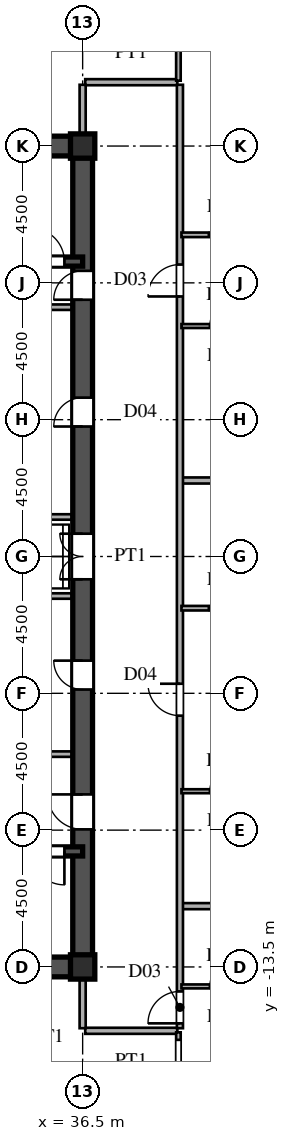
"""IFC4 building model, lengths in metres.
Left out: names, types, materials, properties, quantities, classifications, styles, units other than length and angle.
Written with IfcOpenShell. Run it as: python <this file> out.ifc"""

import sys

from ifc_helpers import new_model, si_unit, direction, frame, frame_2d, origin, origin_2d, place, context, subcontext, project, spatial, rectangle, i_section, extrude, source, transform, mapped, element, fill, save


model = new_model("IFC4")
c1 = context("Model", 3, precision=1e-05, world=origin(), true_north=direction((0.0, 1.0)))
c2 = subcontext(c1, "Body", "Model", "MODEL_VIEW")
j1 = project(units=[si_unit("LENGTHUNIT", "METRE"), si_unit("PLANEANGLEUNIT", "RADIAN")], contexts=[c1])
p1 = place(None, origin())
s1 = spatial("IfcSite", under=j1, at=p1, CompositionType="ELEMENT")
p2 = place(p1, origin())
s2 = spatial("IfcBuilding", under=s1, at=p2, CompositionType="ELEMENT")
p3 = place(p2, frame((0.0, 0.0, 65.7)))
s3 = spatial("IfcBuildingStorey", under=s2, at=p3, CompositionType="ELEMENT", Elevation=65.7)
m1 = source(origin(), c2, "Body", "SweptSolid", [
    extrude(i_section(OverallWidth=0.8, OverallDepth=0.8, WebThickness=0.032, FlangeThickness=0.05, at=origin_2d()), origin(), (0.0, 0.0, 1.0), 3.6),
])
for number, where, z_axis, x_axis in (
    (1, (36.5, -13.5, 0.0), (0.0, 0.0, 1.0), (1.0, 0.0, 0.0)),
    (2, (36.5, 13.5, 0.0), (0.0, 0.0, 1.0), (1.0, 0.0, 0.0)),
):
    element("IfcColumn", number, at=place(p3, frame(where, z_axis=z_axis, x_axis=x_axis)), inside=s3, PredefinedType="COLUMN", context=c2, shape_type="MappedRepresentation", body=[
        mapped(m1, transform((0.0, 0.0, 0.0), scale=1.0)),
    ])
for number, where, z_axis, x_axis in (
    (3, (27.5, -13.5, 0.0), (0.0, 0.0, 1.0), (1.0, 0.0, 0.0)),
    (4, (27.5, 13.5, 0.0), (0.0, 0.0, 1.0), (1.0, 0.0, 0.0)),
):
    element("IfcWall", number, at=place(p3, frame(where, z_axis=z_axis, x_axis=x_axis)), inside=s3, PredefinedType="SHEAR", context=c2, shape_type="SweptSolid", body=[
        extrude(rectangle(XDim=9.0, YDim=0.65, at=frame_2d((4.5, 0.0))), origin(), (0.0, 0.0, 1.0), 3.38),
    ])
p4 = place(p3, frame((36.5, -13.65, 0.0), z_axis=(0.0, 0.0, 1.0), x_axis=(0.0, 1.0, 0.0)))
e5 = element("IfcWall", 5, at=p4, inside=s3, PredefinedType="SHEAR", context=c2, shape_type="SweptSolid", body=[
    extrude(rectangle(XDim=7.15, YDim=0.65, at=frame_2d((3.575, 0.0))), origin(), (0.0, 0.0, 1.0), 3.38),
])
p5 = place(p4, frame((4.675, 0.0, 0.0)))
e6 = element("IfcOpeningElement", 6, at=p5, cuts=e5, PredefinedType="OPENING", context=c2, shape_type="SweptSolid", body=[
    extrude(rectangle(XDim=1.15, YDim=2.2, at=frame_2d((0.575, 1.1))), frame((0.0, 0.335, 0.0), z_axis=(0.0, -1.0, 0.0), x_axis=(1.0, 0.0, 0.0)), (0.0, 0.0, 1.0), 0.67),
])
p6 = place(p3, frame((36.5, -1.3, 0.0), z_axis=(0.0, 0.0, 1.0), x_axis=(0.0, 1.0, 0.0)))
e7 = element("IfcWall", 7, at=p6, inside=s3, PredefinedType="SHEAR", context=c2, shape_type="SweptSolid", body=[
    extrude(rectangle(XDim=2.6, YDim=0.65, at=frame_2d((1.3, 0.0))), origin(), (0.0, 0.0, 1.0), 3.38),
])
p7 = place(p6, frame((0.55, 0.0, 0.0)))
e8 = element("IfcOpeningElement", 8, at=p7, cuts=e7, PredefinedType="OPENING", context=c2, shape_type="SweptSolid", body=[
    extrude(rectangle(XDim=1.5, YDim=2.3, at=frame_2d((0.75, 1.15))), frame((0.0, 0.335, 0.0), z_axis=(0.0, -1.0, 0.0), x_axis=(1.0, 0.0, 0.0)), (0.0, 0.0, 1.0), 0.67),
])
p8 = place(p3, frame((36.5, 8.2, 0.0), z_axis=(0.0, 0.0, 1.0), x_axis=(0.0, 1.0, 0.0)))
e9 = element("IfcWall", 9, at=p8, inside=s3, PredefinedType="SHEAR", context=c2, shape_type="SweptSolid", body=[
    extrude(rectangle(XDim=5.45, YDim=0.65, at=frame_2d((2.725, 0.0))), origin(), (0.0, 0.0, 1.0), 3.38),
])
p9 = place(p8, frame((0.245, 0.0, 0.0)))
e10 = element("IfcOpeningElement", 10, at=p9, cuts=e9, PredefinedType="OPENING", context=c2, shape_type="SweptSolid", body=[
    extrude(rectangle(XDim=0.95, YDim=2.15, at=frame_2d((0.475, 1.075))), frame((0.0, 0.335, 0.0), z_axis=(0.0, -1.0, 0.0), x_axis=(1.0, 0.0, 0.0)), (0.0, 0.0, 1.0), 0.67),
])
p10 = place(p3, frame((36.5, -6.5, 0.0), z_axis=(0.0, 0.0, 1.0), x_axis=(0.0, 1.0, 0.0)))
e11 = element("IfcWall", 11, at=p10, inside=s3, PredefinedType="SHEAR", context=c2, shape_type="SweptSolid", body=[
    extrude(rectangle(XDim=5.2, YDim=0.65, at=frame_2d((2.6, 0.0))), origin(), (0.0, 0.0, 1.0), 3.38),
])
p11 = place(p10, frame((2.125, 0.0, 0.0)))
e12 = element("IfcOpeningElement", 12, at=p11, cuts=e11, PredefinedType="OPENING", context=c2, shape_type="SweptSolid", body=[
    extrude(rectangle(XDim=0.95, YDim=2.15, at=frame_2d((0.475, 1.075))), frame((0.0, 0.335, 0.0), z_axis=(0.0, -1.0, 0.0), x_axis=(1.0, 0.0, 0.0)), (0.0, 0.0, 1.0), 0.67),
])
p12 = place(p3, frame((36.5, 1.3, 0.0), z_axis=(0.0, 0.0, 1.0), x_axis=(0.0, 1.0, 0.0)))
e13 = element("IfcWall", 13, at=p12, inside=s3, PredefinedType="SHEAR", context=c2, shape_type="SweptSolid", body=[
    extrude(rectangle(XDim=6.9, YDim=0.65, at=frame_2d((3.45, 0.0))), origin(), (0.0, 0.0, 1.0), 3.38),
])
p13 = place(p12, frame((2.975, 0.0, 0.0)))
e14 = element("IfcOpeningElement", 14, at=p13, cuts=e13, PredefinedType="OPENING", context=c2, shape_type="SweptSolid", body=[
    extrude(rectangle(XDim=0.95, YDim=2.15, at=frame_2d((0.475, 1.075))), frame((0.0, 0.335, 0.0), z_axis=(0.0, -1.0, 0.0), x_axis=(1.0, 0.0, 0.0)), (0.0, 0.0, 1.0), 0.67),
])
p14 = place(p3, frame((27.5, -9.7, 0.0), z_axis=(0.0, 0.0, 1.0), x_axis=(1.0, 0.0, 0.0)))
e15 = element("IfcWall", 15, at=p14, inside=s3, PredefinedType="SHEAR", context=c2, shape_type="SweptSolid", body=[
    extrude(rectangle(XDim=9.0, YDim=0.3, at=frame_2d((4.5, 0.0))), origin(), (0.0, 0.0, 1.0), 3.38),
])
p15 = place(p14, frame((7.3, 0.0, 0.0)))
e16 = element("IfcOpeningElement", 16, at=p15, cuts=e15, PredefinedType="OPENING", context=c2, shape_type="SweptSolid", body=[
    extrude(rectangle(XDim=1.1, YDim=2.2, at=frame_2d((0.55, 1.1))), frame((0.0, 0.16, 0.0), z_axis=(0.0, -1.0, 0.0), x_axis=(1.0, 0.0, 0.0)), (0.0, 0.0, 1.0), 0.32),
])
p16 = place(p3, frame((27.5, 9.7, 0.0), z_axis=(0.0, 0.0, 1.0), x_axis=(1.0, 0.0, 0.0)))
e17 = element("IfcWall", 17, at=p16, inside=s3, PredefinedType="SHEAR", context=c2, shape_type="SweptSolid", body=[
    extrude(rectangle(XDim=9.0, YDim=0.3, at=frame_2d((4.5, 0.0))), origin(), (0.0, 0.0, 1.0), 3.38),
])
p17 = place(p16, frame((7.3, 0.0, 0.0)))
e18 = element("IfcOpeningElement", 18, at=p17, cuts=e17, PredefinedType="OPENING", context=c2, shape_type="SweptSolid", body=[
    extrude(rectangle(XDim=1.1, YDim=2.2, at=frame_2d((0.55, 1.1))), frame((0.0, 0.16, 0.0), z_axis=(0.0, -1.0, 0.0), x_axis=(1.0, 0.0, 0.0)), (0.0, 0.0, 1.0), 0.32),
])
for number, where, z_axis, x_axis in (
    (19, (30.45, -6.5, 0.0), (0.0, 0.0, 1.0), (1.0, 0.0, 0.0)),
    (20, (30.45, 8.2, 0.0), (0.0, 0.0, 1.0), (1.0, 0.0, 0.0)),
):
    element("IfcWall", number, at=place(p3, frame(where, z_axis=z_axis, x_axis=x_axis)), inside=s3, PredefinedType="PARTITIONING", context=c2, shape_type="SweptSolid", body=[
        extrude(rectangle(XDim=5.7, YDim=0.18, at=frame_2d((2.85, 0.0))), origin(), (0.0, 0.0, 1.0), 3.38),
    ])
for number, where, z_axis, x_axis in (
    (21, (33.2, -1.3, 0.0), (0.0, 0.0, 1.0), (1.0, 0.0, 0.0)),
    (22, (33.2, 1.3, 0.0), (0.0, 0.0, 1.0), (1.0, 0.0, 0.0)),
):
    element("IfcWall", number, at=place(p3, frame(where, z_axis=z_axis, x_axis=x_axis)), inside=s3, PredefinedType="PARTITIONING", context=c2, shape_type="SweptSolid", body=[
        extrude(rectangle(XDim=2.95, YDim=0.18, at=frame_2d((1.475, 0.0))), origin(), (0.0, 0.0, 1.0), 3.38),
    ])
p18 = place(p3, frame((36.585, -15.6, 0.0), z_axis=(0.0, 0.0, 1.0), x_axis=(1.0, 0.0, 0.0)))
e23 = element("IfcWall", 23, at=p18, inside=s3, PredefinedType="PARTITIONING", context=c2, shape_type="SweptSolid", body=[
    extrude(rectangle(XDim=3.03, YDim=0.2, at=frame_2d((1.515, 0.0))), origin(), (0.0, 0.0, 1.0), 3.38),
])
p19 = place(p3, frame((39.75, -14.14, 0.0), z_axis=(0.0, 0.0, 1.0), x_axis=(1.0, 0.0, 0.0)))
e24 = element("IfcWall", 24, at=p19, inside=s3, PredefinedType="PARTITIONING", context=c2, shape_type="SweptSolid", body=[
    extrude(rectangle(XDim=2.75, YDim=0.13, at=frame_2d((1.375, 0.0))), origin(), (0.0, 0.0, 1.0), 3.38),
])
p20 = place(p19, frame((0.935, 0.0, 0.0)))
e25 = element("IfcOpeningElement", 25, at=p20, cuts=e24, PredefinedType="OPENING", context=c2, shape_type="SweptSolid", body=[
    extrude(rectangle(XDim=0.88, YDim=2.1, at=frame_2d((0.44, 1.05))), frame((0.0, 0.075, 0.0), z_axis=(0.0, -1.0, 0.0), x_axis=(1.0, 0.0, 0.0)), (0.0, 0.0, 1.0), 0.15),
])
p21 = place(p3, frame((39.78, -11.5, 0.0), z_axis=(0.0, 0.0, 1.0), x_axis=(1.0, 0.0, 0.0)))
e26 = element("IfcWall", 26, at=p21, inside=s3, PredefinedType="PARTITIONING", context=c2, shape_type="SweptSolid", body=[
    extrude(rectangle(XDim=22.343, YDim=0.2, at=frame_2d((11.171, 0.0))), origin(), (0.0, 0.0, 1.0), 3.38),
])
p22 = place(p3, frame((39.75, -7.72, 0.0), z_axis=(0.0, 0.0, 1.0), x_axis=(1.0, 0.0, 0.0)))
e27 = element("IfcWall", 27, at=p22, inside=s3, PredefinedType="PARTITIONING", context=c2, shape_type="SweptSolid", body=[
    extrude(rectangle(XDim=2.75, YDim=0.13, at=frame_2d((1.375, 0.0))), origin(), (0.0, 0.0, 1.0), 3.38),
])
p23 = place(p22, frame((0.935, 0.0, 0.0)))
e28 = element("IfcOpeningElement", 28, at=p23, cuts=e27, PredefinedType="OPENING", context=c2, shape_type="SweptSolid", body=[
    extrude(rectangle(XDim=0.88, YDim=2.1, at=frame_2d((0.44, 1.05))), frame((0.0, 0.075, 0.0), z_axis=(0.0, -1.0, 0.0), x_axis=(1.0, 0.0, 0.0)), (0.0, 0.0, 1.0), 0.15),
])
p24 = place(p3, frame((39.75, -1.7, 0.0), z_axis=(0.0, 0.0, 1.0), x_axis=(1.0, 0.0, 0.0)))
e29 = element("IfcWall", 29, at=p24, inside=s3, PredefinedType="PARTITIONING", context=c2, shape_type="SweptSolid", body=[
    extrude(rectangle(XDim=2.75, YDim=0.15, at=frame_2d((1.375, 0.0))), origin(), (0.0, 0.0, 1.0), 3.38),
])
p25 = place(p24, frame((0.9, 0.0, 0.0)))
e30 = element("IfcOpeningElement", 30, at=p25, cuts=e29, PredefinedType="OPENING", context=c2, shape_type="SweptSolid", body=[
    extrude(rectangle(XDim=0.95, YDim=2.15, at=frame_2d((0.475, 1.075))), frame((0.0, 0.085, 0.0), z_axis=(0.0, -1.0, 0.0), x_axis=(1.0, 0.0, 0.0)), (0.0, 0.0, 1.0), 0.17),
])
p26 = place(p3, frame((39.78, 2.5, 0.0), z_axis=(0.0, 0.0, 1.0), x_axis=(1.0, 0.0, 0.0)))
e31 = element("IfcWall", 31, at=p26, inside=s3, PredefinedType="PARTITIONING", context=c2, shape_type="SweptSolid", body=[
    extrude(rectangle(XDim=31.225, YDim=0.2, at=frame_2d((15.612, 0.0))), origin(), (0.0, 0.0, 1.0), 3.38),
])
p27 = place(p3, frame((39.75, 7.58, 0.0), z_axis=(0.0, 0.0, 1.0), x_axis=(1.0, 0.0, 0.0)))
e32 = element("IfcWall", 32, at=p27, inside=s3, PredefinedType="PARTITIONING", context=c2, shape_type="SweptSolid", body=[
    extrude(rectangle(XDim=2.75, YDim=0.13, at=frame_2d((1.375, 0.0))), origin(), (0.0, 0.0, 1.0), 3.38),
])
p28 = place(p27, frame((0.935, 0.0, 0.0)))
e33 = element("IfcOpeningElement", 33, at=p28, cuts=e32, PredefinedType="OPENING", context=c2, shape_type="SweptSolid", body=[
    extrude(rectangle(XDim=0.88, YDim=2.1, at=frame_2d((0.44, 1.05))), frame((0.0, 0.075, 0.0), z_axis=(0.0, -1.0, 0.0), x_axis=(1.0, 0.0, 0.0)), (0.0, 0.0, 1.0), 0.15),
])
p29 = place(p3, frame((39.75, 10.58, 0.0), z_axis=(0.0, 0.0, 1.0), x_axis=(1.0, 0.0, 0.0)))
e34 = element("IfcWall", 34, at=p29, inside=s3, PredefinedType="PARTITIONING", context=c2, shape_type="SweptSolid", body=[
    extrude(rectangle(XDim=2.75, YDim=0.15, at=frame_2d((1.375, 0.0))), origin(), (0.0, 0.0, 1.0), 3.38),
])
p30 = place(p29, frame((0.9, 0.0, 0.0)))
e35 = element("IfcOpeningElement", 35, at=p30, cuts=e34, PredefinedType="OPENING", context=c2, shape_type="SweptSolid", body=[
    extrude(rectangle(XDim=0.95, YDim=2.15, at=frame_2d((0.475, 1.075))), frame((0.0, 0.085, 0.0), z_axis=(0.0, -1.0, 0.0), x_axis=(1.0, 0.0, 0.0)), (0.0, 0.0, 1.0), 0.17),
])
p31 = place(p3, frame((36.585, 15.6, 0.0), z_axis=(0.0, 0.0, 1.0), x_axis=(1.0, 0.0, 0.0)))
e36 = element("IfcWall", 36, at=p31, inside=s3, PredefinedType="PARTITIONING", context=c2, shape_type="SweptSolid", body=[
    extrude(rectangle(XDim=3.03, YDim=0.2, at=frame_2d((1.515, 0.0))), origin(), (0.0, 0.0, 1.0), 3.38),
])
for number, where, z_axis, x_axis in (
    (37, (36.5, -15.515, 0.0), (0.0, 0.0, 1.0), (0.0, 1.0, 0.0)),
    (38, (36.5, 13.83, 0.0), (0.0, 0.0, 1.0), (0.0, 1.0, 0.0)),
):
    element("IfcWall", number, at=place(p3, frame(where, z_axis=z_axis, x_axis=x_axis)), inside=s3, PredefinedType="PARTITIONING", context=c2, shape_type="SweptSolid", body=[
        extrude(rectangle(XDim=1.685, YDim=0.2, at=frame_2d((0.842, 0.0))), origin(), (0.0, 0.0, 1.0), 2.68),
    ])
p32 = place(p3, frame((39.65, -21.642, 0.0), z_axis=(0.0, 0.0, 1.0), x_axis=(0.0, 1.0, 0.0)))
e39 = element("IfcWall", 39, at=p32, inside=s3, PredefinedType="PARTITIONING", context=c2, shape_type="SweptSolid", body=[
    extrude(rectangle(XDim=5.992, YDim=0.15, at=frame_2d((2.996, 0.0))), origin(), (0.0, 0.0, 1.0), 3.38),
])
p33 = place(p32, frame((4.794, 0.0, 0.0)))
e40 = element("IfcOpeningElement", 40, at=p33, cuts=e39, PredefinedType="OPENING", context=c2, shape_type="SweptSolid", body=[
    extrude(rectangle(XDim=0.95, YDim=2.15, at=frame_2d((0.475, 1.075))), frame((0.0, 0.085, 0.0), z_axis=(0.0, -1.0, 0.0), x_axis=(1.0, 0.0, 0.0)), (0.0, 0.0, 1.0), 0.17),
])
p34 = place(p3, frame((39.65, 15.65, 0.0), z_axis=(0.0, 0.0, 1.0), x_axis=(0.0, 1.0, 0.0)))
e41 = element("IfcWall", 41, at=p34, inside=s3, PredefinedType="PARTITIONING", context=c2, shape_type="SweptSolid", body=[
    extrude(rectangle(XDim=5.992, YDim=0.15, at=frame_2d((2.996, 0.0))), origin(), (0.0, 0.0, 1.0), 3.38),
])
p35 = place(p34, frame((1.425, 0.0, 0.0)))
e42 = element("IfcOpeningElement", 42, at=p35, cuts=e41, PredefinedType="OPENING", context=c2, shape_type="SweptSolid", body=[
    extrude(rectangle(XDim=0.95, YDim=2.15, at=frame_2d((0.475, 1.075))), frame((0.0, 0.085, 0.0), z_axis=(0.0, -1.0, 0.0), x_axis=(1.0, 0.0, 0.0)), (0.0, 0.0, 1.0), 0.17),
])
p36 = place(p3, frame((39.7, -15.515, 0.0), z_axis=(0.0, 0.0, 1.0), x_axis=(0.0, 1.0, 0.0)))
e43 = element("IfcWall", 43, at=p36, inside=s3, PredefinedType="PARTITIONING", context=c2, shape_type="SweptSolid", body=[
    extrude(rectangle(XDim=31.03, YDim=0.2, at=frame_2d((15.515, 0.0))), origin(), (0.0, 0.0, 1.0), 3.38),
])
p37 = place(p36, frame((0.16, 0.0, 0.0)))
e44 = element("IfcOpeningElement", 44, at=p37, cuts=e43, PredefinedType="OPENING", context=c2, shape_type="SweptSolid", body=[
    extrude(rectangle(XDim=1.05, YDim=2.25, at=frame_2d((0.525, 1.125))), frame((0.0, 0.11, 0.0), z_axis=(0.0, -1.0, 0.0), x_axis=(1.0, 0.0, 0.0)), (0.0, 0.0, 1.0), 0.22),
])
p38 = place(p36, frame((10.28, 0.0, 0.0)))
e45 = element("IfcOpeningElement", 45, at=p38, cuts=e43, PredefinedType="OPENING", context=c2, shape_type="SweptSolid", body=[
    extrude(rectangle(XDim=1.05, YDim=2.25, at=frame_2d((0.525, 1.125))), frame((0.0, 0.11, 0.0), z_axis=(0.0, -1.0, 0.0), x_axis=(1.0, 0.0, 0.0)), (0.0, 0.0, 1.0), 0.22),
])
p39 = place(p36, frame((24.067, 0.0, 0.0)))
e46 = element("IfcOpeningElement", 46, at=p39, cuts=e43, PredefinedType="OPENING", context=c2, shape_type="SweptSolid", body=[
    extrude(rectangle(XDim=1.05, YDim=2.25, at=frame_2d((0.525, 1.125))), frame((0.0, 0.11, 0.0), z_axis=(0.0, -1.0, 0.0), x_axis=(1.0, 0.0, 0.0)), (0.0, 0.0, 1.0), 0.22),
])
m2 = source(origin(), c2, "Body", "SweptSolid", [
    extrude(rectangle(XDim=1.15, YDim=2.2, at=frame_2d((0.575, 1.1))), frame((0.0, 0.025, 0.0), z_axis=(0.0, -1.0, 0.0), x_axis=(1.0, 0.0, 0.0)), (0.0, 0.0, 1.0), 0.05),
])
p40 = place(p5, origin())
e47 = element("IfcDoor", 47, at=p40, inside=s3, OperationType="SINGLE_SWING_RIGHT", PredefinedType="DOOR", context=c2, shape_type="MappedRepresentation", body=[
    mapped(m2, transform((0.0, 0.0, 0.0), scale=1.0)),
])
fill(e6, e47)
m3 = source(origin(), c2, "Body", "SweptSolid", [
    extrude(rectangle(XDim=1.5, YDim=2.3, at=frame_2d((0.75, 1.15))), frame((0.0, 0.025, 0.0), z_axis=(0.0, -1.0, 0.0), x_axis=(1.0, 0.0, 0.0)), (0.0, 0.0, 1.0), 0.05),
])
p41 = place(p7, origin())
e48 = element("IfcDoor", 48, at=p41, inside=s3, OperationType="DOUBLE_SWING_LEFT", PredefinedType="DOOR", context=c2, shape_type="MappedRepresentation", body=[
    mapped(m3, transform((0.0, 0.0, 0.0), scale=1.0)),
])
fill(e8, e48)
m4 = source(origin(), c2, "Body", "SweptSolid", [
    extrude(rectangle(XDim=0.95, YDim=2.15, at=frame_2d((0.475, 1.075))), frame((0.0, 0.025, 0.0), z_axis=(0.0, -1.0, 0.0), x_axis=(1.0, 0.0, 0.0)), (0.0, 0.0, 1.0), 0.05),
])
p42 = place(p9, origin())
e49 = element("IfcDoor", 49, at=p42, inside=s3, OperationType="SINGLE_SWING_LEFT", PredefinedType="DOOR", context=c2, shape_type="MappedRepresentation", body=[
    mapped(m4, transform((0.0, 0.0, 0.0), scale=1.0)),
])
fill(e10, e49)
p43 = place(p11, origin())
e50 = element("IfcDoor", 50, at=p43, inside=s3, OperationType="SINGLE_SWING_RIGHT", PredefinedType="DOOR", context=c2, shape_type="MappedRepresentation", body=[
    mapped(m4, transform((0.0, 0.0, 0.0), scale=1.0)),
])
fill(e12, e50)
p44 = place(p13, origin())
e51 = element("IfcDoor", 51, at=p44, inside=s3, OperationType="SINGLE_SWING_LEFT", PredefinedType="DOOR", context=c2, shape_type="MappedRepresentation", body=[
    mapped(m4, transform((0.0, 0.0, 0.0), scale=1.0)),
])
fill(e14, e51)
m5 = source(origin(), c2, "Body", "SweptSolid", [
    extrude(rectangle(XDim=1.1, YDim=2.2, at=frame_2d((0.55, 1.1))), frame((0.0, 0.025, 0.0), z_axis=(0.0, -1.0, 0.0), x_axis=(1.0, 0.0, 0.0)), (0.0, 0.0, 1.0), 0.05),
])
p45 = place(p15, frame((1.1, 0.0, 0.0), z_axis=(0.0, 0.0, 1.0), x_axis=(-1.0, 0.0, 0.0)))
e52 = element("IfcDoor", 52, at=p45, inside=s3, OperationType="SINGLE_SWING_RIGHT", PredefinedType="DOOR", context=c2, shape_type="MappedRepresentation", body=[
    mapped(m5, transform((0.0, 0.0, 0.0), scale=1.0)),
])
fill(e16, e52)
p46 = place(p17, origin())
e53 = element("IfcDoor", 53, at=p46, inside=s3, OperationType="SINGLE_SWING_LEFT", PredefinedType="DOOR", context=c2, shape_type="MappedRepresentation", body=[
    mapped(m5, transform((0.0, 0.0, 0.0), scale=1.0)),
])
fill(e18, e53)
m6 = source(origin(), c2, "Body", "SweptSolid", [
    extrude(rectangle(XDim=0.88, YDim=2.1, at=frame_2d((0.44, 1.05))), frame((0.0, 0.025, 0.0), z_axis=(0.0, -1.0, 0.0), x_axis=(1.0, 0.0, 0.0)), (0.0, 0.0, 1.0), 0.05),
])
p47 = place(p20, origin())
e54 = element("IfcDoor", 54, at=p47, inside=s3, OperationType="SINGLE_SWING_RIGHT", PredefinedType="DOOR", context=c2, shape_type="MappedRepresentation", body=[
    mapped(m6, transform((0.0, 0.0, 0.0), scale=1.0)),
])
fill(e25, e54)
p48 = place(p23, origin())
e55 = element("IfcDoor", 55, at=p48, inside=s3, OperationType="SINGLE_SWING_RIGHT", PredefinedType="DOOR", context=c2, shape_type="MappedRepresentation", body=[
    mapped(m6, transform((0.0, 0.0, 0.0), scale=1.0)),
])
fill(e28, e55)
p49 = place(p28, origin())
e56 = element("IfcDoor", 56, at=p49, inside=s3, OperationType="SINGLE_SWING_RIGHT", PredefinedType="DOOR", context=c2, shape_type="MappedRepresentation", body=[
    mapped(m6, transform((0.0, 0.0, 0.0), scale=1.0)),
])
fill(e33, e56)
m7 = source(origin(), c2, "Body", "SweptSolid", [
    extrude(rectangle(XDim=1.05, YDim=2.25, at=frame_2d((0.525, 1.125))), frame((0.0, 0.025, 0.0), z_axis=(0.0, -1.0, 0.0), x_axis=(1.0, 0.0, 0.0)), (0.0, 0.0, 1.0), 0.05),
])
p50 = place(p37, origin())
e57 = element("IfcDoor", 57, at=p50, inside=s3, OperationType="SINGLE_SWING_LEFT", PredefinedType="DOOR", context=c2, shape_type="MappedRepresentation", body=[
    mapped(m7, transform((0.0, 0.0, 0.0), scale=1.0)),
])
fill(e44, e57)
p51 = place(p38, origin())
e58 = element("IfcDoor", 58, at=p51, inside=s3, OperationType="SINGLE_SWING_RIGHT", PredefinedType="DOOR", context=c2, shape_type="MappedRepresentation", body=[
    mapped(m7, transform((0.0, 0.0, 0.0), scale=1.0)),
])
fill(e45, e58)
p52 = place(p39, origin())
e59 = element("IfcDoor", 59, at=p52, inside=s3, OperationType="SINGLE_SWING_LEFT", PredefinedType="DOOR", context=c2, shape_type="MappedRepresentation", body=[
    mapped(m7, transform((0.0, 0.0, 0.0), scale=1.0)),
])
fill(e46, e59)
save(model, sys.argv[1])
